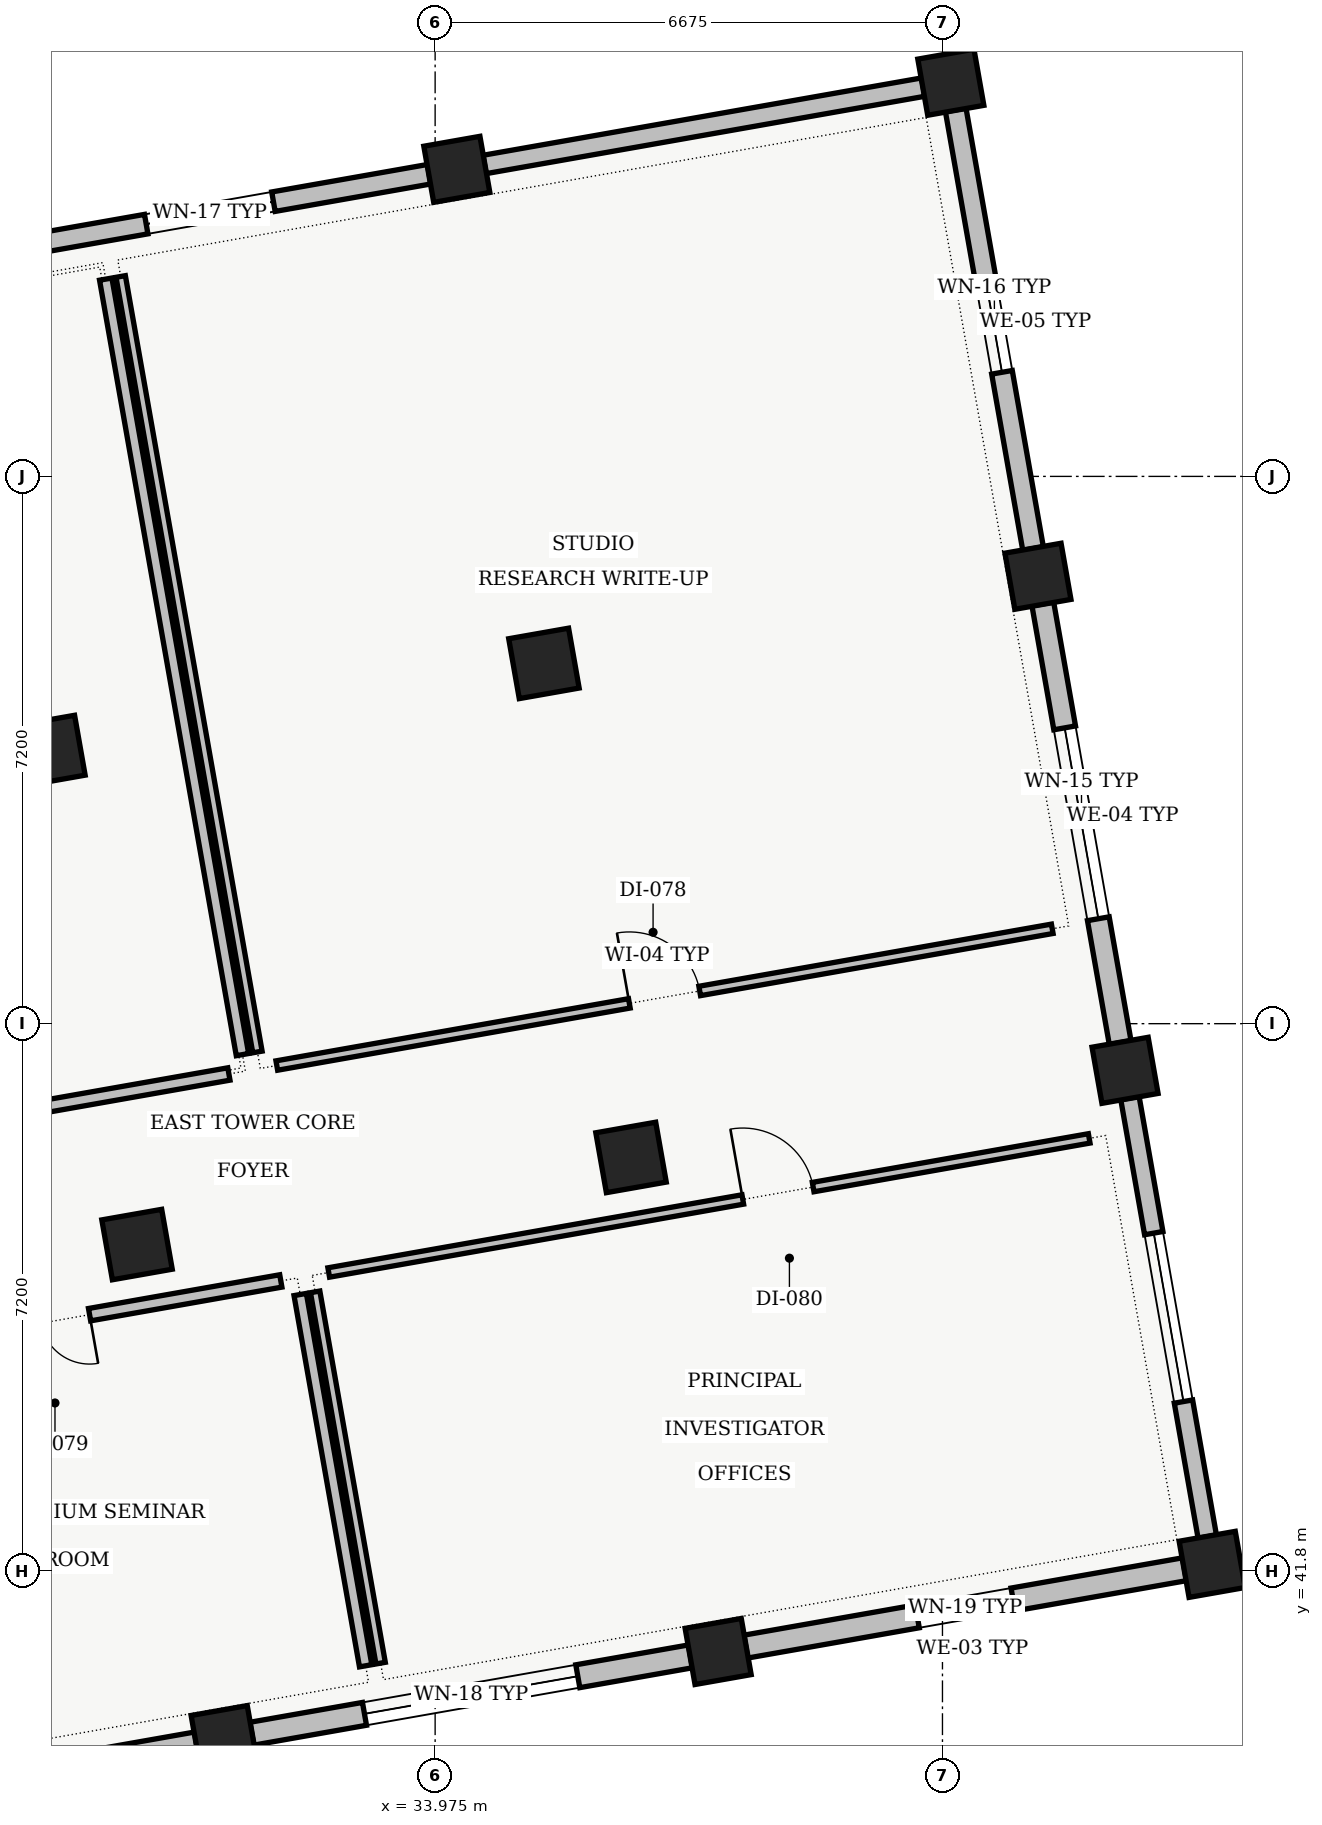
"""IFC4 building model, lengths in metres.
Left out: names, types, materials, properties, quantities, classifications, styles, units other than length and angle.
Written with IfcOpenShell. Run it as: python <this file> out.ifc"""

import sys

from ifc_helpers import new_model, si_unit, direction, frame, frame_2d, origin, origin_2d, place, context, subcontext, project, spatial, rectangle, extrude, element, fill, save


model = new_model("IFC4")
c1 = context("Model", 3, precision=1e-05, world=origin(), true_north=direction((0.0, 1.0)))
c2 = subcontext(c1, "Body", "Model", "MODEL_VIEW")
j1 = project(units=[si_unit("LENGTHUNIT", "METRE"), si_unit("PLANEANGLEUNIT", "RADIAN")], contexts=[c1])
p1 = place(None, origin())
s1 = spatial("IfcSite", under=j1, at=p1, CompositionType="ELEMENT")
p2 = place(p1, origin())
s2 = spatial("IfcBuilding", under=s1, at=p2, CompositionType="ELEMENT")
p3 = place(p2, frame((0.0, 0.0, 5.1)))
s3 = spatial("IfcBuildingStorey", under=s2, at=p3, CompositionType="ELEMENT", Elevation=5.1)
p4 = place(p3, frame((31.199, 39.594, 0.0), z_axis=(0.0, 0.0, 1.0), x_axis=(0.984807753012, 0.173648177667, 0.0)))
e1 = element("IfcColumn", 1, at=p4, inside=s3, PredefinedType="COLUMN", context=c2, shape_type="SweptSolid", body=[
    extrude(rectangle(XDim=0.75, YDim=0.75, at=origin_2d()), origin(), (0.0, 0.0, 1.0), 4.31),
])
for number, where, z_axis, x_axis in (
    (2, (30.053, 46.094, 0.0), (0.0, 0.0, 1.0), (0.985, 0.174, 0.0)),
    (3, (28.907, 52.594, 0.0), (0.0, 0.0, 1.0), (0.985, 0.174, 0.0)),
):
    element("IfcColumn", number, at=place(p3, frame(where, z_axis=z_axis, x_axis=x_axis)), inside=s3, PredefinedType="COLUMN", context=c2, shape_type="SweptSolid", body=[
        extrude(rectangle(XDim=0.8, YDim=0.8, at=origin_2d()), origin(), (0.0, 0.0, 1.0), 4.31),
    ])
p5 = place(p3, frame((37.699, 40.74, 0.0), z_axis=(0.0, 0.0, 1.0), x_axis=(0.984807753012, 0.173648177667, 0.0)))
e4 = element("IfcColumn", 4, at=p5, inside=s3, PredefinedType="COLUMN", context=c2, shape_type="SweptSolid", body=[
    extrude(rectangle(XDim=0.75, YDim=0.75, at=origin_2d()), origin(), (0.0, 0.0, 1.0), 4.31),
])
for number, where, z_axis, x_axis in (
    (5, (36.552, 47.24, 0.0), (0.0, 0.0, 1.0), (0.985, 0.174, 0.0)),
    (6, (35.406, 53.74, 0.0), (0.0, 0.0, 1.0), (0.985, 0.174, 0.0)),
):
    element("IfcColumn", number, at=place(p3, frame(where, z_axis=z_axis, x_axis=x_axis)), inside=s3, PredefinedType="COLUMN", context=c2, shape_type="SweptSolid", body=[
        extrude(rectangle(XDim=0.8, YDim=0.8, at=origin_2d()), origin(), (0.0, 0.0, 1.0), 4.31),
    ])
for number, where, z_axis, x_axis in (
    (7, (34.26, 60.24, 0.0), (0.0, 0.0, 1.0), (0.985, 0.174, 0.0)),
    (8, (44.198, 41.886, 0.0), (0.0, 0.0, 1.0), (0.985, 0.174, 0.0)),
    (9, (43.052, 48.386, 0.0), (0.0, 0.0, 1.0), (0.985, 0.174, 0.0)),
    (10, (41.906, 54.886, 0.0), (0.0, 0.0, 1.0), (0.985, 0.174, 0.0)),
    (11, (40.76, 61.386, 0.0), (0.0, 0.0, 1.0), (0.985, 0.174, 0.0)),
):
    element("IfcColumn", number, at=place(p3, frame(where, z_axis=z_axis, x_axis=x_axis)), inside=s3, PredefinedType="COLUMN", context=c2, shape_type="SweptSolid", body=[
        extrude(rectangle(XDim=0.75, YDim=0.75, at=origin_2d()), origin(), (0.0, 0.0, 1.0), 4.31),
    ])
p6 = place(p3, frame((28.125, 59.158, 0.0), z_axis=(0.0, 0.0, 1.0), x_axis=(0.984807875342, 0.1736474839, 0.0)))
e12 = element("IfcWall", 12, at=p6, inside=s3, PredefinedType="STANDARD", context=c2, shape_type="SweptSolid", body=[
    extrude(rectangle(XDim=5.86, YDim=0.26, at=frame_2d((2.93, 0.0))), origin(), (0.0, 0.0, 1.0), 3.795),
])
p7 = place(p6, frame((2.08, 0.0, 0.95)))
e13 = element("IfcOpeningElement", 13, at=p7, cuts=e12, PredefinedType="OPENING", context=c2, shape_type="SweptSolid", body=[
    extrude(rectangle(XDim=1.7, YDim=1.55, at=frame_2d((0.85, 0.775))), frame((0.0, 0.13, 0.0), z_axis=(0.0, -1.0, 0.0), x_axis=(1.0, 0.0, 0.0)), (0.0, 0.0, 1.0), 0.26),
])
p8 = place(p3, frame((34.625, 60.304, 0.0), z_axis=(0.0, 0.0, 1.0), x_axis=(0.984807875342, 0.1736474839, 0.0)))
e14 = element("IfcWall", 14, at=p8, inside=s3, PredefinedType="STANDARD", context=c2, shape_type="SweptSolid", body=[
    extrude(rectangle(XDim=5.86, YDim=0.245, at=frame_2d((2.93, 0.0))), origin(), (0.0, 0.0, 1.0), 3.795),
])
p9 = place(p3, frame((40.824, 61.021, 0.0), z_axis=(0.0, 0.0, 1.0), x_axis=(0.1736474839, -0.984807875342, 0.0)))
e15 = element("IfcWall", 15, at=p9, inside=s3, PredefinedType="STANDARD", context=c2, shape_type="SweptSolid", body=[
    extrude(rectangle(XDim=5.86, YDim=0.275, at=frame_2d((2.93, 0.0))), origin(), (0.0, 0.0, 1.0), 3.795),
])
p10 = place(p9, frame((2.355, 0.0, 0.95)))
e16 = element("IfcOpeningElement", 16, at=p10, cuts=e15, PredefinedType="OPENING", context=c2, shape_type="SweptSolid", body=[
    extrude(rectangle(XDim=1.15, YDim=1.6, at=frame_2d((0.575, 0.8))), frame((0.0, 0.137, 0.0), z_axis=(0.0, -1.0, 0.0), x_axis=(1.0, 0.0, 0.0)), (0.0, 0.0, 1.0), 0.275),
])
p11 = place(p3, frame((41.97, 54.521, 0.0), z_axis=(0.0, 0.0, 1.0), x_axis=(0.1736474839, -0.984807875342, 0.0)))
e17 = element("IfcWall", 17, at=p11, inside=s3, PredefinedType="STANDARD", context=c2, shape_type="SweptSolid", body=[
    extrude(rectangle(XDim=5.86, YDim=0.29, at=frame_2d((2.93, 0.0))), origin(), (0.0, 0.0, 1.0), 3.795),
])
p12 = place(p11, frame((1.655, 0.0, 0.95)))
e18 = element("IfcOpeningElement", 18, at=p12, cuts=e17, PredefinedType="OPENING", context=c2, shape_type="SweptSolid", body=[
    extrude(rectangle(XDim=2.55, YDim=1.75, at=frame_2d((1.275, 0.875))), frame((0.0, 0.145, 0.0), z_axis=(0.0, -1.0, 0.0), x_axis=(1.0, 0.0, 0.0)), (0.0, 0.0, 1.0), 0.29),
])
p13 = place(p3, frame((43.116, 48.022, 0.0), z_axis=(0.0, 0.0, 1.0), x_axis=(0.1736474839, -0.984807875342, 0.0)))
e19 = element("IfcWall", 19, at=p13, inside=s3, PredefinedType="STANDARD", context=c2, shape_type="SweptSolid", body=[
    extrude(rectangle(XDim=5.86, YDim=0.245, at=frame_2d((2.93, 0.0))), origin(), (0.0, 0.0, 1.0), 3.795),
])
p14 = place(p13, frame((1.805, 0.0, 0.95)))
e20 = element("IfcOpeningElement", 20, at=p14, cuts=e19, PredefinedType="OPENING", context=c2, shape_type="SweptSolid", body=[
    extrude(rectangle(XDim=2.25, YDim=1.55, at=frame_2d((1.125, 0.775))), frame((0.0, 0.123, 0.0), z_axis=(0.0, -1.0, 0.0), x_axis=(1.0, 0.0, 0.0)), (0.0, 0.0, 1.0), 0.245),
])
p15 = place(p3, frame((43.834, 41.822, 0.0), z_axis=(0.0, 0.0, 1.0), x_axis=(-0.984807875342, -0.1736474839, 0.0)))
e21 = element("IfcWall", 21, at=p15, inside=s3, PredefinedType="STANDARD", context=c2, shape_type="SweptSolid", body=[
    extrude(rectangle(XDim=5.86, YDim=0.305, at=frame_2d((2.93, 0.0))), origin(), (0.0, 0.0, 1.0), 3.795),
])
p16 = place(p15, frame((2.29, 0.0, 0.95)))
e22 = element("IfcOpeningElement", 22, at=p16, cuts=e21, PredefinedType="OPENING", context=c2, shape_type="SweptSolid", body=[
    extrude(rectangle(XDim=1.28, YDim=1.42, at=frame_2d((0.64, 0.71))), frame((0.0, 0.152, 0.0), z_axis=(0.0, -1.0, 0.0), x_axis=(1.0, 0.0, 0.0)), (0.0, 0.0, 1.0), 0.305),
])
p17 = place(p3, frame((37.334, 40.676, 0.0), z_axis=(0.0, 0.0, 1.0), x_axis=(-0.984807875342, -0.1736474839, 0.0)))
e23 = element("IfcWall", 23, at=p17, inside=s3, PredefinedType="STANDARD", context=c2, shape_type="SweptSolid", body=[
    extrude(rectangle(XDim=5.86, YDim=0.305, at=frame_2d((2.93, 0.0))), origin(), (0.0, 0.0, 1.0), 3.795),
])
p18 = place(p17, frame((1.505, 0.0, 0.95)))
e24 = element("IfcOpeningElement", 24, at=p18, cuts=e23, PredefinedType="OPENING", context=c2, shape_type="SweptSolid", body=[
    extrude(rectangle(XDim=2.85, YDim=1.5, at=frame_2d((1.425, 0.75))), frame((0.0, 0.152, 0.0), z_axis=(0.0, -1.0, 0.0), x_axis=(1.0, 0.0, 0.0)), (0.0, 0.0, 1.0), 0.305),
])
p19 = place(p3, frame((30.834, 39.53, 0.0), z_axis=(0.0, 0.0, 1.0), x_axis=(-0.984807875342, -0.1736474839, 0.0)))
e25 = element("IfcWall", 25, at=p19, inside=s3, PredefinedType="STANDARD", context=c2, shape_type="SweptSolid", body=[
    extrude(rectangle(XDim=5.86, YDim=0.305, at=frame_2d((2.93, 0.0))), origin(), (0.0, 0.0, 1.0), 3.795),
])
p20 = place(p19, frame((2.08, 0.0, 0.95)))
e26 = element("IfcOpeningElement", 26, at=p20, cuts=e25, PredefinedType="OPENING", context=c2, shape_type="SweptSolid", body=[
    extrude(rectangle(XDim=1.7, YDim=1.55, at=frame_2d((0.85, 0.775))), frame((0.0, 0.152, 0.0), z_axis=(0.0, -1.0, 0.0), x_axis=(1.0, 0.0, 0.0)), (0.0, 0.0, 1.0), 0.305),
])
p21 = place(p3, frame((20.665, 46.469, 0.0), z_axis=(0.0, 0.0, 1.0), x_axis=(0.984804338045, 0.173667543796, 0.0)))
e27 = element("IfcWall", 27, at=p21, inside=s3, PredefinedType="PARTITIONING", context=c2, shape_type="SweptSolid", body=[
    extrude(rectangle(XDim=10.76, YDim=0.165, at=frame_2d((5.38, 0.0))), origin(), (0.0, 0.0, 1.0), 3.95),
])
p22 = place(p21, frame((4.865, 0.0, 0.0)))
e28 = element("IfcOpeningElement", 28, at=p22, cuts=e27, PredefinedType="OPENING", context=c2, shape_type="SweptSolid", body=[
    extrude(rectangle(XDim=1.03, YDim=2.16, at=frame_2d((0.515, 1.08))), frame((0.0, 0.083, 0.0), z_axis=(0.0, -1.0, 0.0), x_axis=(1.0, 0.0, 0.0)), (0.0, 0.0, 1.0), 0.165),
])
p23 = place(p3, frame((31.44, 48.593, 0.0), z_axis=(0.0, 0.0, 1.0), x_axis=(-0.173632075677, 0.984810592092, 0.0)))
e29 = element("IfcWall", 29, at=p23, inside=s3, PredefinedType="PARTITIONING", context=c2, shape_type="SweptSolid", body=[
    extrude(rectangle(XDim=10.36, YDim=0.165, at=frame_2d((5.18, 0.0))), origin(), (0.0, 0.0, 1.0), 3.95),
])
p24 = place(p3, frame((31.892, 48.449, 0.0), z_axis=(0.0, 0.0, 1.0), x_axis=(0.984810592092, 0.173632075677, 0.0)))
e30 = element("IfcWall", 30, at=p24, inside=s3, PredefinedType="PARTITIONING", context=c2, shape_type="SweptSolid", body=[
    extrude(rectangle(XDim=10.36, YDim=0.125, at=frame_2d((5.18, 0.0))), origin(), (0.0, 0.0, 1.0), 3.95),
])
p25 = place(p24, frame((4.71, 0.0, 0.0)))
e31 = element("IfcOpeningElement", 31, at=p25, cuts=e30, PredefinedType="OPENING", context=c2, shape_type="SweptSolid", body=[
    extrude(rectangle(XDim=0.94, YDim=2.12, at=frame_2d((0.47, 1.06))), frame((0.0, 0.062, 0.0), z_axis=(0.0, -1.0, 0.0), x_axis=(1.0, 0.0, 0.0)), (0.0, 0.0, 1.0), 0.125),
])
p26 = place(p3, frame((29.838, 58.83, 0.0), z_axis=(0.0, 0.0, 1.0), x_axis=(0.173654930775, -0.984806562233, 0.0)))
e32 = element("IfcWall", 32, at=p26, inside=s3, PredefinedType="PARTITIONING", context=c2, shape_type="SweptSolid", body=[
    extrude(rectangle(XDim=10.36, YDim=0.125, at=frame_2d((5.18, 0.0))), origin(), (0.0, 0.0, 1.0), 3.95),
])
p27 = place(p3, frame((33.061, 40.552, 0.0), z_axis=(0.0, 0.0, 1.0), x_axis=(-0.173658971256, 0.98480584975, 0.0)))
e33 = element("IfcWall", 33, at=p27, inside=s3, PredefinedType="PARTITIONING", context=c2, shape_type="SweptSolid", body=[
    extrude(rectangle(XDim=4.96, YDim=0.165, at=frame_2d((2.48, 0.0))), origin(), (0.0, 0.0, 1.0), 3.95),
])
p28 = place(p3, frame((31.945, 45.615, 0.0), z_axis=(0.0, 0.0, 1.0), x_axis=(-0.984809620557, -0.173637585958, 0.0)))
e34 = element("IfcWall", 34, at=p28, inside=s3, PredefinedType="PARTITIONING", context=c2, shape_type="SweptSolid", body=[
    extrude(rectangle(XDim=6.41, YDim=0.165, at=frame_2d((3.205, 0.0))), origin(), (0.0, 0.0, 1.0), 3.95),
])
p29 = place(p28, frame((2.555, 0.0, 0.0)))
e35 = element("IfcOpeningElement", 35, at=p29, cuts=e34, PredefinedType="OPENING", context=c2, shape_type="SweptSolid", body=[
    extrude(rectangle(XDim=1.3, YDim=2.18, at=frame_2d((0.65, 1.09))), frame((0.0, 0.083, 0.0), z_axis=(0.0, -1.0, 0.0), x_axis=(1.0, 0.0, 0.0)), (0.0, 0.0, 1.0), 0.165),
])
p30 = place(p3, frame((42.581, 47.491, 0.0), z_axis=(0.0, 0.0, 1.0), x_axis=(-0.98480532288, -0.173661959067, 0.0)))
e36 = element("IfcWall", 36, at=p30, inside=s3, PredefinedType="PARTITIONING", context=c2, shape_type="SweptSolid", body=[
    extrude(rectangle(XDim=10.16, YDim=0.125, at=frame_2d((5.08, 0.0))), origin(), (0.0, 0.0, 1.0), 3.95),
])
p31 = place(p30, frame((3.688, 0.0, 0.0)))
e37 = element("IfcOpeningElement", 37, at=p31, cuts=e36, PredefinedType="OPENING", context=c2, shape_type="SweptSolid", body=[
    extrude(rectangle(XDim=0.94, YDim=2.12, at=frame_2d((0.47, 1.06))), frame((0.0, 0.062, 0.0), z_axis=(0.0, -1.0, 0.0), x_axis=(1.0, 0.0, 0.0)), (0.0, 0.0, 1.0), 0.125),
])
p32 = place(p3, frame((32.396, 45.472, 0.0), z_axis=(0.0, 0.0, 1.0), x_axis=(0.173650553511, -0.984807334084, 0.0)))
e38 = element("IfcWall", 38, at=p32, inside=s3, PredefinedType="PARTITIONING", context=c2, shape_type="SweptSolid", body=[
    extrude(rectangle(XDim=4.96, YDim=0.125, at=frame_2d((2.48, 0.0))), origin(), (0.0, 0.0, 1.0), 3.95),
])
p33 = place(p7, origin())
e39 = element("IfcWindow", 39, at=p33, inside=s3, PartitioningType="SINGLE_PANEL", PredefinedType="WINDOW", context=c2, shape_type="SweptSolid", body=[
    extrude(rectangle(XDim=1.7, YDim=1.55, at=frame_2d((0.85, 0.775))), frame((0.0, 0.03, 0.0), z_axis=(0.0, -1.0, 0.0), x_axis=(1.0, 0.0, 0.0)), (0.0, 0.0, 1.0), 0.06),
])
fill(e13, e39)
p34 = place(p10, origin())
e40 = element("IfcWindow", 40, at=p34, inside=s3, PartitioningType="SINGLE_PANEL", PredefinedType="WINDOW", context=c2, shape_type="SweptSolid", body=[
    extrude(rectangle(XDim=1.15, YDim=1.6, at=frame_2d((0.575, 0.8))), frame((0.0, 0.03, 0.0), z_axis=(0.0, -1.0, 0.0), x_axis=(1.0, 0.0, 0.0)), (0.0, 0.0, 1.0), 0.06),
])
fill(e16, e40)
p35 = place(p12, origin())
e41 = element("IfcWindow", 41, at=p35, inside=s3, PartitioningType="SINGLE_PANEL", PredefinedType="WINDOW", context=c2, shape_type="SweptSolid", body=[
    extrude(rectangle(XDim=2.55, YDim=1.75, at=frame_2d((1.275, 0.875))), frame((0.0, 0.03, 0.0), z_axis=(0.0, -1.0, 0.0), x_axis=(1.0, 0.0, 0.0)), (0.0, 0.0, 1.0), 0.06),
])
fill(e18, e41)
p36 = place(p14, origin())
e42 = element("IfcWindow", 42, at=p36, inside=s3, PartitioningType="SINGLE_PANEL", PredefinedType="WINDOW", context=c2, shape_type="SweptSolid", body=[
    extrude(rectangle(XDim=2.25, YDim=1.55, at=frame_2d((1.125, 0.775))), frame((0.0, 0.03, 0.0), z_axis=(0.0, -1.0, 0.0), x_axis=(1.0, 0.0, 0.0)), (0.0, 0.0, 1.0), 0.06),
])
fill(e20, e42)
p37 = place(p16, origin())
e43 = element("IfcWindow", 43, at=p37, inside=s3, PartitioningType="SINGLE_PANEL", PredefinedType="WINDOW", context=c2, shape_type="SweptSolid", body=[
    extrude(rectangle(XDim=1.28, YDim=1.42, at=frame_2d((0.64, 0.71))), frame((0.0, 0.03, 0.0), z_axis=(0.0, -1.0, 0.0), x_axis=(1.0, 0.0, 0.0)), (0.0, 0.0, 1.0), 0.06),
])
fill(e22, e43)
p38 = place(p18, origin())
e44 = element("IfcWindow", 44, at=p38, inside=s3, PartitioningType="SINGLE_PANEL", PredefinedType="WINDOW", context=c2, shape_type="SweptSolid", body=[
    extrude(rectangle(XDim=2.85, YDim=1.5, at=frame_2d((1.425, 0.75))), frame((0.0, 0.03, 0.0), z_axis=(0.0, -1.0, 0.0), x_axis=(1.0, 0.0, 0.0)), (0.0, 0.0, 1.0), 0.06),
])
fill(e24, e44)
p39 = place(p25, origin())
e45 = element("IfcDoor", 45, at=p39, inside=s3, OperationType="SINGLE_SWING_LEFT", PredefinedType="DOOR", context=c2, shape_type="SweptSolid", body=[
    extrude(rectangle(XDim=0.94, YDim=2.12, at=frame_2d((0.47, 1.06))), frame((0.0, 0.025, 0.0), z_axis=(0.0, -1.0, 0.0), x_axis=(1.0, 0.0, 0.0)), (0.0, 0.0, 1.0), 0.05),
])
fill(e31, e45)
p40 = place(p29, origin())
e46 = element("IfcDoor", 46, at=p40, inside=s3, OperationType="DOUBLE_DOOR_SINGLE_SWING", PredefinedType="DOOR", context=c2, shape_type="SweptSolid", body=[
    extrude(rectangle(XDim=1.3, YDim=2.18, at=frame_2d((0.65, 1.09))), frame((0.0, 0.025, 0.0), z_axis=(0.0, -1.0, 0.0), x_axis=(1.0, 0.0, 0.0)), (0.0, 0.0, 1.0), 0.05),
])
fill(e35, e46)
p41 = place(p31, origin())
e47 = element("IfcDoor", 47, at=p41, inside=s3, OperationType="SINGLE_SWING_RIGHT", PredefinedType="DOOR", context=c2, shape_type="SweptSolid", body=[
    extrude(rectangle(XDim=0.94, YDim=2.12, at=frame_2d((0.47, 1.06))), frame((0.0, 0.025, 0.0), z_axis=(0.0, -1.0, 0.0), x_axis=(1.0, 0.0, 0.0)), (0.0, 0.0, 1.0), 0.05),
])
fill(e37, e47)
save(model, sys.argv[1])
